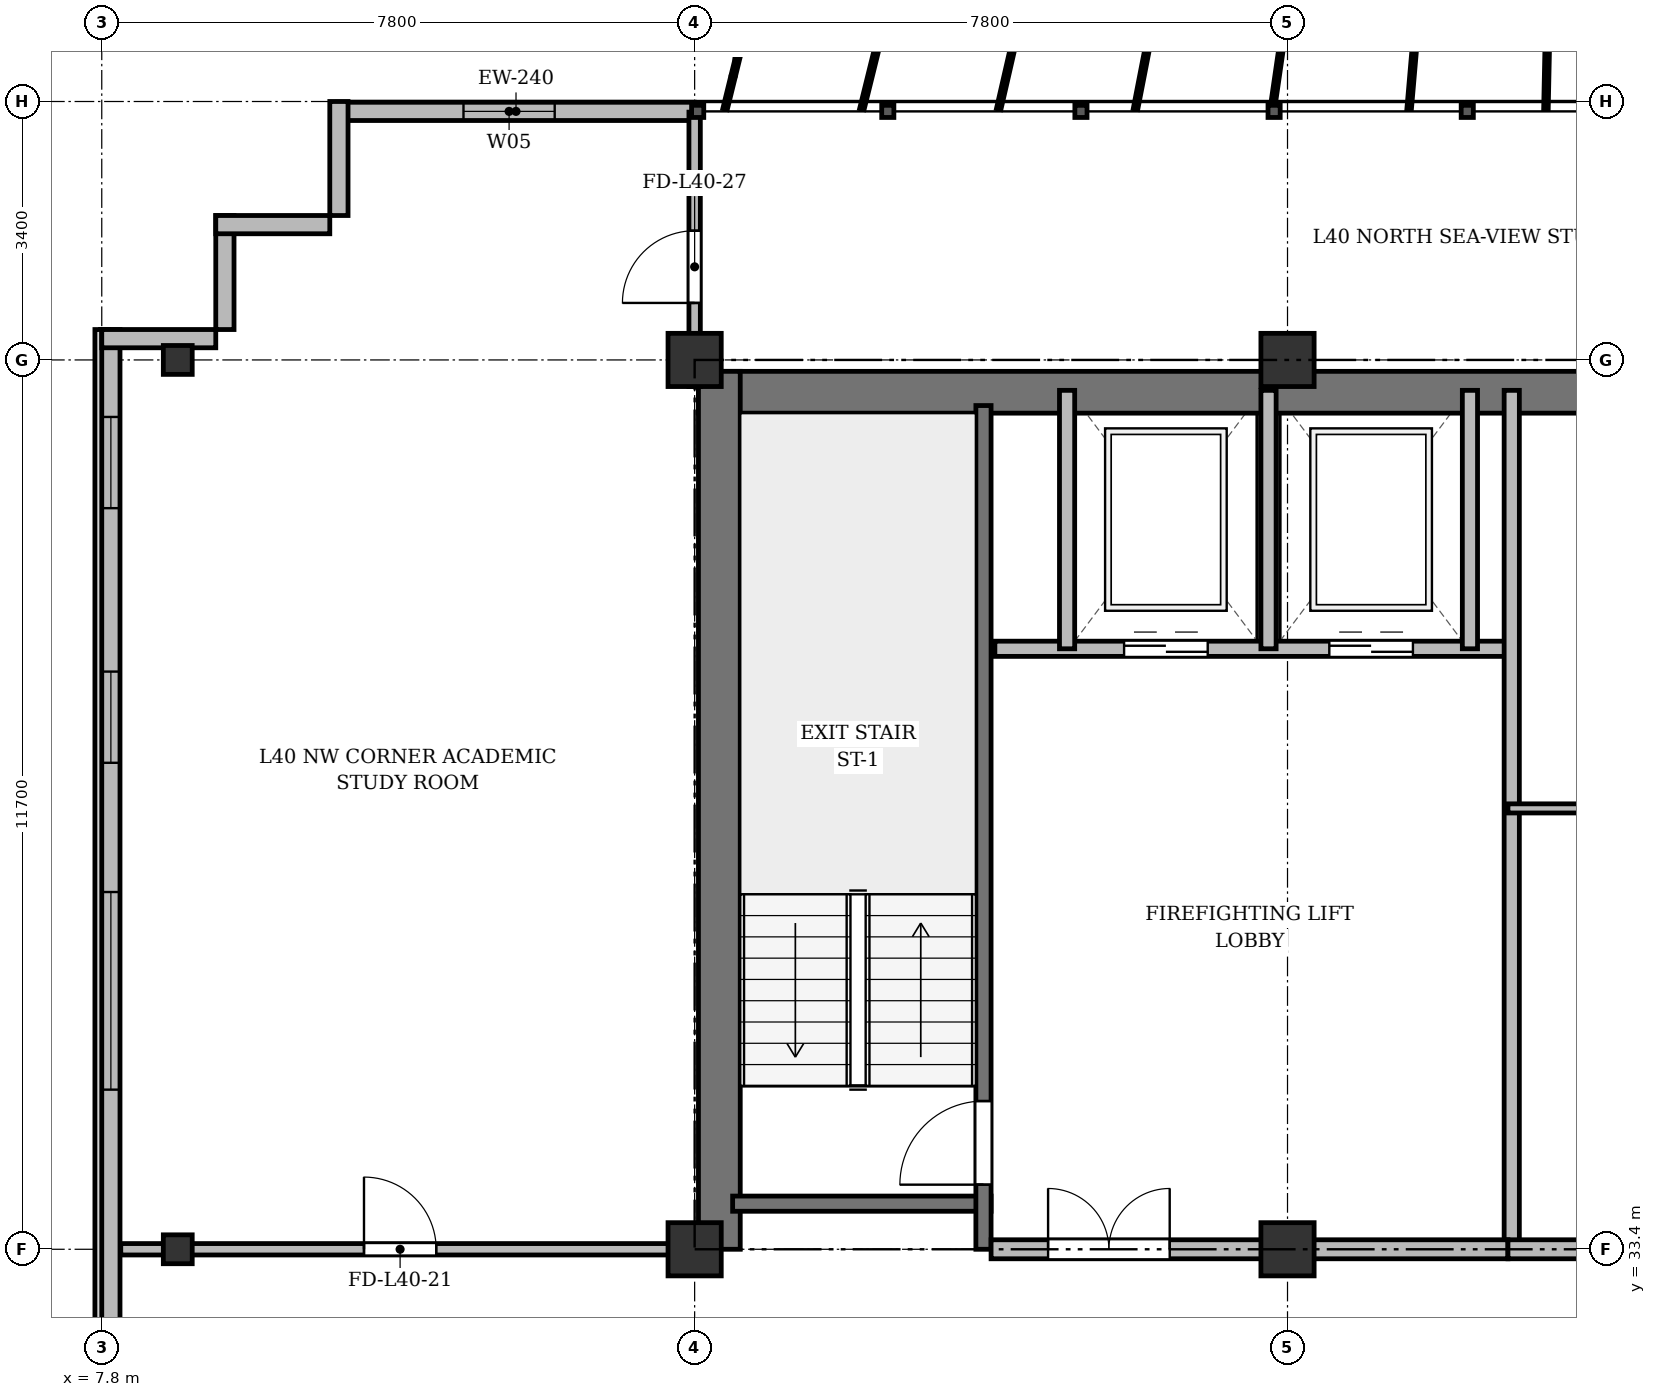
"""IFC4 building model, lengths in metres.
Left out: names, types, materials, properties, quantities, classifications, styles, units other than length and angle.
Written with IfcOpenShell. Run it as: python <this file> out.ifc"""

import sys

from ifc_helpers import new_model, si_unit, direction, frame, frame_2d, origin, origin_2d, place, context, subcontext, project, spatial, rectangle, i_section, extrude, source, transform, mapped, element, fill, save


model = new_model("IFC4")
c1 = context("Model", 3, precision=1e-05, world=origin(), true_north=direction((0.0, 1.0)))
c2 = subcontext(c1, "Body", "Model", "MODEL_VIEW")
j1 = project(units=[si_unit("LENGTHUNIT", "METRE"), si_unit("PLANEANGLEUNIT", "RADIAN")], contexts=[c1])
p1 = place(None, origin())
s1 = spatial("IfcSite", under=j1, at=p1, CompositionType="ELEMENT")
p2 = place(p1, origin())
s2 = spatial("IfcBuilding", under=s1, at=p2, CompositionType="ELEMENT")
p3 = place(p2, frame((0.0, 0.0, 153.7)))
s3 = spatial("IfcBuildingStorey", under=s2, at=p3, CompositionType="ELEMENT", Elevation=153.7)
m1 = source(origin(), c2, "Body", "SweptSolid", [
    extrude(i_section(OverallWidth=0.38, OverallDepth=0.38, WebThickness=0.02, FlangeThickness=0.03, at=origin_2d()), origin(), (0.0, 0.0, 1.0), 3.6),
])
for number, where, z_axis, x_axis in (
    (1, (8.8, 33.4, 0.0), (0.0, 0.0, 1.0), (1.0, 0.0, 0.0)),
    (2, (8.8, 45.1, 0.0), (0.0, 0.0, 1.0), (1.0, 0.0, 0.0)),
):
    element("IfcColumn", number, at=place(p3, frame(where, z_axis=z_axis, x_axis=x_axis)), inside=s3, PredefinedType="COLUMN", context=c2, shape_type="MappedRepresentation", body=[
        mapped(m1, transform((0.0, 0.0, 0.0), x_axis=(1.0, 0.0, 0.0), y_axis=(0.0, 1.0, 0.0), z_axis=(0.0, 0.0, 1.0), scale=1.0)),
    ])
m2 = source(origin(), c2, "Body", "SweptSolid", [
    extrude(rectangle(XDim=0.7, YDim=0.7, at=origin_2d()), origin(), (0.0, 0.0, 1.0), 3.6),
])
for number, where, z_axis, x_axis in (
    (3, (15.6, 33.4, 0.0), (0.0, 0.0, 1.0), (1.0, 0.0, 0.0)),
    (4, (15.6, 45.1, 0.0), (0.0, 0.0, 1.0), (1.0, 0.0, 0.0)),
    (5, (23.4, 33.4, 0.0), (0.0, 0.0, 1.0), (1.0, 0.0, 0.0)),
    (6, (23.4, 45.1, 0.0), (0.0, 0.0, 1.0), (1.0, 0.0, 0.0)),
):
    element("IfcColumn", number, at=place(p3, frame(where, z_axis=z_axis, x_axis=x_axis)), inside=s3, PredefinedType="COLUMN", context=c2, shape_type="MappedRepresentation", body=[
        mapped(m2, transform((0.0, 0.0, 0.0), x_axis=(1.0, 0.0, 0.0), y_axis=(0.0, 1.0, 0.0), z_axis=(0.0, 0.0, 1.0), scale=1.0)),
    ])
p4 = place(p3, frame((10.9, 48.37, 0.0), z_axis=(0.0, 0.0, 1.0), x_axis=(1.0, 0.0, 0.0)))
e7 = element("IfcWall", 7, at=p4, inside=s3, PredefinedType="SOLIDWALL", context=c2, shape_type="SweptSolid", body=[
    extrude(rectangle(XDim=4.7, YDim=0.24, at=frame_2d((2.35, 0.0))), origin(), (0.0, 0.0, 1.0), 3.35),
])
p5 = place(p4, frame((1.659, 0.0, 0.9)))
e8 = element("IfcOpeningElement", 8, at=p5, cuts=e7, PredefinedType="OPENING", context=c2, shape_type="SweptSolid", body=[
    extrude(rectangle(XDim=1.2, YDim=1.65, at=frame_2d((0.6, 0.825))), frame((0.0, 0.13, 0.0), z_axis=(0.0, -1.0, 0.0), x_axis=(1.0, 0.0, 0.0)), (0.0, 0.0, 1.0), 0.26),
])
p6 = place(p3, frame((7.92, 6.3, 0.0), z_axis=(0.0, 0.0, 1.0), x_axis=(0.0, 1.0, 0.0)))
e9 = element("IfcWall", 9, at=p6, inside=s3, PredefinedType="SOLIDWALL", context=c2, shape_type="SweptSolid", body=[
    extrude(rectangle(XDim=39.2, YDim=0.24, at=frame_2d((19.6, 0.0))), origin(), (0.0, 0.0, 1.0), 3.35),
])
p7 = place(p6, frame((1.45, 0.0, 0.92)))
e10 = element("IfcOpeningElement", 10, at=p7, cuts=e9, PredefinedType="OPENING", context=c2, shape_type="SweptSolid", body=[
    extrude(rectangle(XDim=1.2, YDim=1.65, at=frame_2d((0.6, 0.825))), frame((0.0, 0.13, 0.0), z_axis=(0.0, -1.0, 0.0), x_axis=(1.0, 0.0, 0.0)), (0.0, 0.0, 1.0), 0.26),
])
p8 = place(p6, frame((3.8, 0.0, 0.92)))
e11 = element("IfcOpeningElement", 11, at=p8, cuts=e9, PredefinedType="OPENING", context=c2, shape_type="SweptSolid", body=[
    extrude(rectangle(XDim=2.6, YDim=1.9, at=frame_2d((1.3, 0.95))), frame((0.0, 0.13, 0.0), z_axis=(0.0, -1.0, 0.0), x_axis=(1.0, 0.0, 0.0)), (0.0, 0.0, 1.0), 0.26),
])
p9 = place(p6, frame((8.0, 0.0, 0.92)))
e12 = element("IfcOpeningElement", 12, at=p9, cuts=e9, PredefinedType="OPENING", context=c2, shape_type="SweptSolid", body=[
    extrude(rectangle(XDim=2.6, YDim=1.9, at=frame_2d((1.3, 0.95))), frame((0.0, 0.13, 0.0), z_axis=(0.0, -1.0, 0.0), x_axis=(1.0, 0.0, 0.0)), (0.0, 0.0, 1.0), 0.26),
])
p10 = place(p6, frame((15.2, 0.0, 0.92)))
e13 = element("IfcOpeningElement", 13, at=p10, cuts=e9, PredefinedType="OPENING", context=c2, shape_type="SweptSolid", body=[
    extrude(rectangle(XDim=2.6, YDim=1.9, at=frame_2d((1.3, 0.95))), frame((0.0, 0.13, 0.0), z_axis=(0.0, -1.0, 0.0), x_axis=(1.0, 0.0, 0.0)), (0.0, 0.0, 1.0), 0.26),
])
p11 = place(p6, frame((29.2, 0.0, 0.92)))
e14 = element("IfcOpeningElement", 14, at=p11, cuts=e9, PredefinedType="OPENING", context=c2, shape_type="SweptSolid", body=[
    extrude(rectangle(XDim=2.6, YDim=1.9, at=frame_2d((1.3, 0.95))), frame((0.0, 0.13, 0.0), z_axis=(0.0, -1.0, 0.0), x_axis=(1.0, 0.0, 0.0)), (0.0, 0.0, 1.0), 0.26),
])
p12 = place(p6, frame((33.5, 0.0, 0.92)))
e15 = element("IfcOpeningElement", 15, at=p12, cuts=e9, PredefinedType="OPENING", context=c2, shape_type="SweptSolid", body=[
    extrude(rectangle(XDim=1.2, YDim=1.65, at=frame_2d((0.6, 0.825))), frame((0.0, 0.13, 0.0), z_axis=(0.0, -1.0, 0.0), x_axis=(1.0, 0.0, 0.0)), (0.0, 0.0, 1.0), 0.26),
])
p13 = place(p6, frame((36.85, 0.0, 0.92)))
e16 = element("IfcOpeningElement", 16, at=p13, cuts=e9, PredefinedType="OPENING", context=c2, shape_type="SweptSolid", body=[
    extrude(rectangle(XDim=1.2, YDim=1.65, at=frame_2d((0.6, 0.825))), frame((0.0, 0.13, 0.0), z_axis=(0.0, -1.0, 0.0), x_axis=(1.0, 0.0, 0.0)), (0.0, 0.0, 1.0), 0.26),
])
for number, where, z_axis, x_axis in (
    (17, (7.8, 45.38, 0.0), (0.0, 0.0, 1.0), (1.0, 0.0, 0.0)),
    (18, (9.42, 45.5, 0.0), (0.0, 0.0, 1.0), (0.0, 1.0, 0.0)),
    (19, (9.3, 46.88, 0.0), (0.0, 0.0, 1.0), (1.0, 0.0, 0.0)),
    (20, (10.92, 47.0, 0.0), (0.0, 0.0, 1.0), (0.0, 1.0, 0.0)),
):
    element("IfcWall", number, at=place(p3, frame(where, z_axis=z_axis, x_axis=x_axis)), inside=s3, PredefinedType="SOLIDWALL", context=c2, shape_type="SweptSolid", body=[
        extrude(rectangle(XDim=1.5, YDim=0.24, at=frame_2d((0.75, 0.0))), origin(), (0.0, 0.0, 1.0), 3.35),
    ])
p14 = place(p3, frame((15.65, 44.675, 0.0), z_axis=(0.0, 0.0, 1.0), x_axis=(1.0, 0.0, 0.0)))
e21 = element("IfcWall", 21, at=p14, inside=s3, PredefinedType="SHEAR", context=c2, shape_type="SweptSolid", body=[
    extrude(rectangle(XDim=43.1, YDim=0.55, at=frame_2d((21.55, 0.0))), origin(), (0.0, 0.0, 1.0), 3.35),
])
p15 = place(p3, frame((15.925, 33.4, 0.0), z_axis=(0.0, 0.0, 1.0), x_axis=(0.0, 1.0, 0.0)))
e22 = element("IfcWall", 22, at=p15, inside=s3, PredefinedType="SHEAR", context=c2, shape_type="SweptSolid", body=[
    extrude(rectangle(XDim=11.55, YDim=0.55, at=frame_2d((5.775, 0.0))), origin(), (0.0, 0.0, 1.0), 3.35),
])
p16 = place(p3, frame((16.1, 34.0, 0.0), z_axis=(0.0, 0.0, 1.0), x_axis=(1.0, 0.0, 0.0)))
e23 = element("IfcWall", 23, at=p16, inside=s3, PredefinedType="SHEAR", context=c2, shape_type="SweptSolid", body=[
    extrude(rectangle(XDim=3.4, YDim=0.2, at=frame_2d((1.7, 0.0))), origin(), (0.0, 0.0, 1.0), 3.35),
])
p17 = place(p3, frame((19.4, 33.4, 0.0), z_axis=(0.0, 0.0, 1.0), x_axis=(0.0, 1.0, 0.0)))
e24 = element("IfcWall", 24, at=p17, inside=s3, PredefinedType="SHEAR", context=c2, shape_type="SweptSolid", body=[
    extrude(rectangle(XDim=11.1, YDim=0.2, at=frame_2d((5.55, 0.0))), origin(), (0.0, 0.0, 1.0), 3.35),
])
p18 = place(p17, frame((0.85, 0.0, 0.0)))
e25 = element("IfcOpeningElement", 25, at=p18, cuts=e24, PredefinedType="OPENING", context=c2, shape_type="SweptSolid", body=[
    extrude(rectangle(XDim=1.1, YDim=2.15, at=frame_2d((0.55, 1.075))), frame((0.0, 0.11, 0.0), z_axis=(0.0, -1.0, 0.0), x_axis=(1.0, 0.0, 0.0)), (0.0, 0.0, 1.0), 0.22),
])
p19 = place(p3, frame((19.55, 41.3, 0.0), z_axis=(0.0, 0.0, 1.0), x_axis=(1.0, 0.0, 0.0)))
e26 = element("IfcWall", 26, at=p19, inside=s3, PredefinedType="SOLIDWALL", context=c2, shape_type="SweptSolid", body=[
    extrude(rectangle(XDim=6.75, YDim=0.2, at=frame_2d((3.375, 0.0))), origin(), (0.0, 0.0, 1.0), 3.35),
])
p20 = place(p19, frame((1.7, 0.0, 0.0)))
e27 = element("IfcOpeningElement", 27, at=p20, cuts=e26, PredefinedType="OPENING", context=c2, shape_type="SweptSolid", body=[
    extrude(rectangle(XDim=1.1, YDim=2.15, at=frame_2d((0.55, 1.075))), frame((0.0, 0.11, 0.0), z_axis=(0.0, -1.0, 0.0), x_axis=(1.0, 0.0, 0.0)), (0.0, 0.0, 1.0), 0.22),
])
p21 = place(p19, frame((4.4, 0.0, 0.0)))
e28 = element("IfcOpeningElement", 28, at=p21, cuts=e26, PredefinedType="OPENING", context=c2, shape_type="SweptSolid", body=[
    extrude(rectangle(XDim=1.1, YDim=2.15, at=frame_2d((0.55, 1.075))), frame((0.0, 0.11, 0.0), z_axis=(0.0, -1.0, 0.0), x_axis=(1.0, 0.0, 0.0)), (0.0, 0.0, 1.0), 0.22),
])
for number, where, z_axis, x_axis in (
    (29, (20.5, 41.3, 0.0), (0.0, 0.0, 1.0), (0.0, 1.0, 0.0)),
    (30, (23.15, 41.3, 0.0), (0.0, 0.0, 1.0), (0.0, 1.0, 0.0)),
    (31, (25.8, 41.3, 0.0), (0.0, 0.0, 1.0), (0.0, 1.0, 0.0)),
):
    element("IfcWall", number, at=place(p3, frame(where, z_axis=z_axis, x_axis=x_axis)), inside=s3, PredefinedType="SOLIDWALL", context=c2, shape_type="SweptSolid", body=[
        extrude(rectangle(XDim=3.4, YDim=0.2, at=frame_2d((1.7, 0.0))), origin(), (0.0, 0.0, 1.0), 3.35),
    ])
p22 = place(p3, frame((26.35, 33.4, 0.0), z_axis=(0.0, 0.0, 1.0), x_axis=(0.0, 1.0, 0.0)))
e32 = element("IfcWall", 32, at=p22, inside=s3, PredefinedType="SOLIDWALL", context=c2, shape_type="SweptSolid", body=[
    extrude(rectangle(XDim=11.3, YDim=0.2, at=frame_2d((5.65, 0.0))), origin(), (0.0, 0.0, 1.0), 2.75),
])
p23 = place(p3, frame((19.5, 33.4, 0.0), z_axis=(0.0, 0.0, 1.0), x_axis=(1.0, 0.0, 0.0)))
e33 = element("IfcWall", 33, at=p23, inside=s3, PredefinedType="PARTITIONING", context=c2, shape_type="SweptSolid", body=[
    extrude(rectangle(XDim=6.8, YDim=0.25, at=frame_2d((3.4, 0.0))), origin(), (0.0, 0.0, 1.0), 2.75),
])
p24 = place(p23, frame((0.75, 0.0, 0.0)))
e34 = element("IfcOpeningElement", 34, at=p24, cuts=e33, PredefinedType="OPENING", context=c2, shape_type="SweptSolid", body=[
    extrude(rectangle(XDim=1.6, YDim=2.2, at=frame_2d((0.8, 1.1))), frame((0.0, 0.135, 0.0), z_axis=(0.0, -1.0, 0.0), x_axis=(1.0, 0.0, 0.0)), (0.0, 0.0, 1.0), 0.27),
])
p25 = place(p3, frame((26.3, 39.2, 0.0), z_axis=(0.0, 0.0, 1.0), x_axis=(1.0, 0.0, 0.0)))
e35 = element("IfcWall", 35, at=p25, inside=s3, PredefinedType="PARTITIONING", context=c2, shape_type="SweptSolid", body=[
    extrude(rectangle(XDim=7.0, YDim=0.12, at=frame_2d((3.5, 0.0))), origin(), (0.0, 0.0, 1.0), 2.85),
])
p26 = place(p25, frame((2.6, 0.0, 0.0)))
e36 = element("IfcOpeningElement", 36, at=p26, cuts=e35, PredefinedType="OPENING", context=c2, shape_type="SweptSolid", body=[
    extrude(rectangle(XDim=0.95, YDim=2.15, at=frame_2d((0.475, 1.075))), frame((0.0, 0.07, 0.0), z_axis=(0.0, -1.0, 0.0), x_axis=(1.0, 0.0, 0.0)), (0.0, 0.0, 1.0), 0.14),
])
p27 = place(p3, frame((26.3, 33.4, 0.0), z_axis=(0.0, 0.0, 1.0), x_axis=(1.0, 0.0, 0.0)))
e37 = element("IfcWall", 37, at=p27, inside=s3, PredefinedType="PARTITIONING", context=c2, shape_type="SweptSolid", body=[
    extrude(rectangle(XDim=7.0, YDim=0.25, at=frame_2d((3.5, 0.0))), origin(), (0.0, 0.0, 1.0), 2.75),
])
p28 = place(p27, frame((1.35, 0.0, 0.0)))
e38 = element("IfcOpeningElement", 38, at=p28, cuts=e37, PredefinedType="OPENING", context=c2, shape_type="SweptSolid", body=[
    extrude(rectangle(XDim=0.95, YDim=2.15, at=frame_2d((0.475, 1.075))), frame((0.0, 0.135, 0.0), z_axis=(0.0, -1.0, 0.0), x_axis=(1.0, 0.0, 0.0)), (0.0, 0.0, 1.0), 0.27),
])
p29 = place(p3, frame((8.05, 33.4, 0.0), z_axis=(0.0, 0.0, 1.0), x_axis=(1.0, 0.0, 0.0)))
e39 = element("IfcWall", 39, at=p29, inside=s3, PredefinedType="PARTITIONING", context=c2, shape_type="SweptSolid", body=[
    extrude(rectangle(XDim=7.55, YDim=0.15, at=frame_2d((3.775, 0.0))), origin(), (0.0, 0.0, 1.0), 2.75),
])
p30 = place(p29, frame((3.2, 0.0, 0.0)))
e40 = element("IfcOpeningElement", 40, at=p30, cuts=e39, PredefinedType="OPENING", context=c2, shape_type="SweptSolid", body=[
    extrude(rectangle(XDim=0.95, YDim=2.15, at=frame_2d((0.475, 1.075))), frame((0.0, 0.085, 0.0), z_axis=(0.0, -1.0, 0.0), x_axis=(1.0, 0.0, 0.0)), (0.0, 0.0, 1.0), 0.17),
])
p31 = place(p3, frame((15.6, 44.75, 0.0), z_axis=(0.0, 0.0, 1.0), x_axis=(0.0, 1.0, 0.0)))
e41 = element("IfcWall", 41, at=p31, inside=s3, PredefinedType="PARTITIONING", context=c2, shape_type="SweptSolid", body=[
    extrude(rectangle(XDim=3.61, YDim=0.15, at=frame_2d((1.805, 0.0))), origin(), (0.0, 0.0, 1.0), 2.85),
])
p32 = place(p31, frame((1.1, 0.0, 0.0)))
e42 = element("IfcOpeningElement", 42, at=p32, cuts=e41, PredefinedType="OPENING", context=c2, shape_type="SweptSolid", body=[
    extrude(rectangle(XDim=0.95, YDim=2.15, at=frame_2d((0.475, 1.075))), frame((0.0, 0.085, 0.0), z_axis=(0.0, -1.0, 0.0), x_axis=(1.0, 0.0, 0.0)), (0.0, 0.0, 1.0), 0.17),
])
m3 = source(origin(), c2, "Body", "SweptSolid", [
    extrude(rectangle(XDim=1.2, YDim=1.65, at=frame_2d((0.6, 0.825))), frame((0.0, 0.03, 0.0), z_axis=(0.0, -1.0, 0.0), x_axis=(1.0, 0.0, 0.0)), (0.0, 0.0, 1.0), 0.06),
])
p33 = place(p5, origin())
e43 = element("IfcWindow", 43, at=p33, inside=s3, PartitioningType="SINGLE_PANEL", PredefinedType="WINDOW", context=c2, shape_type="MappedRepresentation", body=[
    mapped(m3, transform((0.0, 0.0, 0.0), x_axis=(1.0, 0.0, 0.0), y_axis=(0.0, 1.0, 0.0), z_axis=(0.0, 0.0, 1.0), scale=1.0)),
])
fill(e8, e43)
m4 = source(origin(), c2, "Body", "SweptSolid", [
    extrude(rectangle(XDim=2.6, YDim=1.9, at=frame_2d((1.3, 0.95))), frame((0.0, 0.03, 0.0), z_axis=(0.0, -1.0, 0.0), x_axis=(1.0, 0.0, 0.0)), (0.0, 0.0, 1.0), 0.06),
])
p34 = place(p11, origin())
e44 = element("IfcWindow", 44, at=p34, inside=s3, PartitioningType="SINGLE_PANEL", PredefinedType="WINDOW", context=c2, shape_type="MappedRepresentation", body=[
    mapped(m4, transform((0.0, 0.0, 0.0), x_axis=(1.0, 0.0, 0.0), y_axis=(0.0, 1.0, 0.0), z_axis=(0.0, 0.0, 1.0), scale=1.0)),
])
fill(e14, e44)
p35 = place(p12, origin())
e45 = element("IfcWindow", 45, at=p35, inside=s3, PartitioningType="SINGLE_PANEL", PredefinedType="WINDOW", context=c2, shape_type="MappedRepresentation", body=[
    mapped(m3, transform((0.0, 0.0, 0.0), x_axis=(1.0, 0.0, 0.0), y_axis=(0.0, 1.0, 0.0), z_axis=(0.0, 0.0, 1.0), scale=1.0)),
])
fill(e15, e45)
p36 = place(p13, origin())
e46 = element("IfcWindow", 46, at=p36, inside=s3, PartitioningType="SINGLE_PANEL", PredefinedType="WINDOW", context=c2, shape_type="MappedRepresentation", body=[
    mapped(m3, transform((0.0, 0.0, 0.0), x_axis=(1.0, 0.0, 0.0), y_axis=(0.0, 1.0, 0.0), z_axis=(0.0, 0.0, 1.0), scale=1.0)),
])
fill(e16, e46)
m5 = source(origin(), c2, "Body", "SweptSolid", [
    extrude(rectangle(XDim=1.1, YDim=2.15, at=frame_2d((0.55, 1.075))), frame((0.0, 0.025, 0.0), z_axis=(0.0, -1.0, 0.0), x_axis=(1.0, 0.0, 0.0)), (0.0, 0.0, 1.0), 0.05),
])
p37 = place(p18, origin())
e47 = element("IfcDoor", 47, at=p37, inside=s3, OperationType="SINGLE_SWING_LEFT", PredefinedType="DOOR", context=c2, shape_type="MappedRepresentation", body=[
    mapped(m5, transform((0.0, 0.0, 0.0), x_axis=(1.0, 0.0, 0.0), y_axis=(0.0, 1.0, 0.0), z_axis=(0.0, 0.0, 1.0), scale=1.0)),
])
fill(e25, e47)
p38 = place(p20, origin())
e48 = element("IfcDoor", 48, at=p38, inside=s3, OperationType="DOUBLE_DOOR_SLIDING", PredefinedType="DOOR", context=c2, shape_type="MappedRepresentation", body=[
    mapped(m5, transform((0.0, 0.0, 0.0), x_axis=(1.0, 0.0, 0.0), y_axis=(0.0, 1.0, 0.0), z_axis=(0.0, 0.0, 1.0), scale=1.0)),
])
fill(e27, e48)
p39 = place(p21, origin())
e49 = element("IfcDoor", 49, at=p39, inside=s3, OperationType="DOUBLE_DOOR_SLIDING", PredefinedType="DOOR", context=c2, shape_type="MappedRepresentation", body=[
    mapped(m5, transform((0.0, 0.0, 0.0), x_axis=(1.0, 0.0, 0.0), y_axis=(0.0, 1.0, 0.0), z_axis=(0.0, 0.0, 1.0), scale=1.0)),
])
fill(e28, e49)
m6 = source(origin(), c2, "Body", "SweptSolid", [
    extrude(rectangle(XDim=1.6, YDim=2.2, at=frame_2d((0.8, 1.1))), frame((0.0, 0.025, 0.0), z_axis=(0.0, -1.0, 0.0), x_axis=(1.0, 0.0, 0.0)), (0.0, 0.0, 1.0), 0.05),
])
p40 = place(p24, origin())
e50 = element("IfcDoor", 50, at=p40, inside=s3, OperationType="DOUBLE_DOOR_SINGLE_SWING", PredefinedType="DOOR", context=c2, shape_type="MappedRepresentation", body=[
    mapped(m6, transform((0.0, 0.0, 0.0), x_axis=(1.0, 0.0, 0.0), y_axis=(0.0, 1.0, 0.0), z_axis=(0.0, 0.0, 1.0), scale=1.0)),
])
fill(e34, e50)
m7 = source(origin(), c2, "Body", "SweptSolid", [
    extrude(rectangle(XDim=0.95, YDim=2.15, at=frame_2d((0.475, 1.075))), frame((0.0, 0.025, 0.0), z_axis=(0.0, -1.0, 0.0), x_axis=(1.0, 0.0, 0.0)), (0.0, 0.0, 1.0), 0.05),
])
p41 = place(p30, origin())
e51 = element("IfcDoor", 51, at=p41, inside=s3, OperationType="SINGLE_SWING_LEFT", PredefinedType="DOOR", context=c2, shape_type="MappedRepresentation", body=[
    mapped(m7, transform((0.0, 0.0, 0.0), x_axis=(1.0, 0.0, 0.0), y_axis=(0.0, 1.0, 0.0), z_axis=(0.0, 0.0, 1.0), scale=1.0)),
])
fill(e40, e51)
p42 = place(p32, origin())
e52 = element("IfcDoor", 52, at=p42, inside=s3, OperationType="SINGLE_SWING_LEFT", PredefinedType="DOOR", context=c2, shape_type="MappedRepresentation", body=[
    mapped(m7, transform((0.0, 0.0, 0.0), x_axis=(1.0, 0.0, 0.0), y_axis=(0.0, 1.0, 0.0), z_axis=(0.0, 0.0, 1.0), scale=1.0)),
])
fill(e42, e52)
save(model, sys.argv[1])
